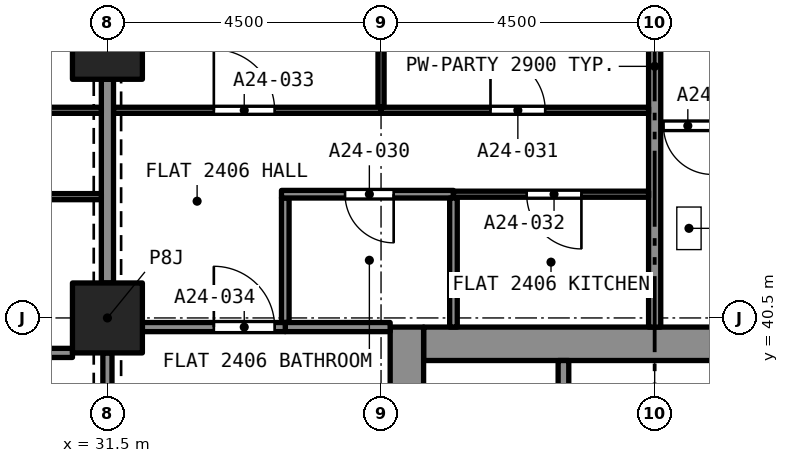
"""IFC4 building model, lengths in metres.
Left out: names, types, materials, properties, quantities, classifications, styles, units other than length and angle.
Written with IfcOpenShell. Run it as: python <this file> out.ifc"""

import sys

from ifc_helpers import new_model, si_unit, direction, frame, frame_2d, origin, origin_2d, place, context, subcontext, project, spatial, rectangle, extrude, element, fill, save


model = new_model("IFC4")
c1 = context("Model", 3, precision=1e-05, world=origin(), true_north=direction((0.0, 1.0)))
c2 = subcontext(c1, "Body", "Model", "MODEL_VIEW")
j1 = project(units=[si_unit("LENGTHUNIT", "METRE"), si_unit("PLANEANGLEUNIT", "RADIAN")], contexts=[c1])
p1 = place(None, origin())
s1 = spatial("IfcSite", under=j1, at=p1, CompositionType="ELEMENT")
p2 = place(p1, origin())
s2 = spatial("IfcBuilding", under=s1, at=p2, CompositionType="ELEMENT")
p3 = place(p2, frame((0.0, 0.0, 89.6)))
s3 = spatial("IfcBuildingStorey", under=s2, at=p3, CompositionType="ELEMENT", Elevation=89.6)
for number, where, z_axis, x_axis in (
    (1, (31.5, 40.5, 0.0), (0.0, 0.0, 1.0), (1.0, 0.0, 0.0)),
    (2, (31.5, 45.0, 0.0), (0.0, 0.0, 1.0), (1.0, 0.0, 0.0)),
):
    element("IfcColumn", number, at=place(p3, frame(where, z_axis=z_axis, x_axis=x_axis)), inside=s3, PredefinedType="COLUMN", context=c2, shape_type="SweptSolid", body=[
        extrude(rectangle(XDim=1.15, YDim=1.15, at=origin_2d()), origin(), (0.0, 0.0, 1.0), 3.2),
    ])
p4 = place(p3, frame((36.7, 40.075, 0.0), z_axis=(0.0, 0.0, 1.0), x_axis=(1.0, 0.0, 0.0)))
e3 = element("IfcWall", 3, at=p4, inside=s3, PredefinedType="SOLIDWALL", context=c2, shape_type="SweptSolid", body=[
    extrude(rectangle(XDim=7.6, YDim=0.55, at=frame_2d((3.8, 0.0))), origin(), (0.0, 0.0, 1.0), 3.2),
])
p5 = place(p3, frame((36.425, 27.15, 0.0), z_axis=(0.0, 0.0, 1.0), x_axis=(0.0, 1.0, 0.0)))
e4 = element("IfcWall", 4, at=p5, inside=s3, PredefinedType="SOLIDWALL", context=c2, shape_type="SweptSolid", body=[
    extrude(rectangle(XDim=13.2, YDim=0.55, at=frame_2d((6.6, 0.0))), origin(), (0.0, 0.0, 1.0), 3.2),
])
p6 = place(p5, frame((8.8, 0.0, 0.0)))
e5 = element("IfcOpeningElement", 5, at=p6, cuts=e4, PredefinedType="OPENING", context=c2, shape_type="SweptSolid", body=[
    extrude(rectangle(XDim=1.2, YDim=2.1, at=frame_2d((0.6, 1.05))), frame((0.0, 0.285, 0.0), z_axis=(0.0, -1.0, 0.0), x_axis=(1.0, 0.0, 0.0)), (0.0, 0.0, 1.0), 0.57),
])
p7 = place(p3, frame((41.591, 43.66, 0.0), z_axis=(0.0, 0.0, 1.0), x_axis=(-1.0, 0.0, 0.0)))
e6 = element("IfcWall", 6, at=p7, inside=s3, PredefinedType="PARTITIONING", context=c2, shape_type="SweptSolid", body=[
    extrude(rectangle(XDim=0.991, YDim=0.125, at=frame_2d((0.495, 0.0))), origin(), (0.0, 0.0, 1.0), 2.9),
])
p8 = place(p7, frame((0.146, 0.0, 0.0)))
e7 = element("IfcOpeningElement", 7, at=p8, cuts=e6, PredefinedType="OPENING", context=c2, shape_type="SweptSolid", body=[
    extrude(rectangle(XDim=0.8, YDim=2.1, at=frame_2d((0.4, 1.05))), frame((0.0, 0.073, 0.0), z_axis=(0.0, -1.0, 0.0), x_axis=(1.0, 0.0, 0.0)), (0.0, 0.0, 1.0), 0.145),
])
p9 = place(p3, frame((40.5, 40.35, 0.0), z_axis=(0.0, 0.0, 1.0), x_axis=(0.0, 1.0, 0.0)))
e8 = element("IfcWall", 8, at=p9, inside=s3, PredefinedType="PARTITIONING", context=c2, shape_type="SweptSolid", body=[
    extrude(rectangle(XDim=8.575, YDim=0.2, at=frame_2d((4.288, 0.0))), origin(), (0.0, 0.0, 1.0), 2.9),
])
p10 = place(p3, frame((34.425, 40.425, 0.0), z_axis=(0.0, 0.0, 1.0), x_axis=(0.0, 1.0, 0.0)))
e9 = element("IfcWall", 9, at=p10, inside=s3, PredefinedType="PARTITIONING", context=c2, shape_type="SweptSolid", body=[
    extrude(rectangle(XDim=2.047, YDim=0.125, at=frame_2d((1.024, 0.0))), origin(), (0.0, 0.0, 1.0), 2.9),
])
p11 = place(p3, frame((37.19, 42.535, 0.0), z_axis=(0.0, 0.0, 1.0), x_axis=(-1.0, 0.0, 0.0)))
e10 = element("IfcWall", 10, at=p11, inside=s3, PredefinedType="PARTITIONING", context=c2, shape_type="SweptSolid", body=[
    extrude(rectangle(XDim=2.828, YDim=0.125, at=frame_2d((1.414, 0.0))), origin(), (0.0, 0.0, 1.0), 2.9),
])
p12 = place(p11, frame((0.983, 0.0, 0.0)))
e11 = element("IfcOpeningElement", 11, at=p12, cuts=e10, PredefinedType="OPENING", context=c2, shape_type="SweptSolid", body=[
    extrude(rectangle(XDim=0.8, YDim=2.1, at=frame_2d((0.4, 1.05))), frame((0.0, 0.073, 0.0), z_axis=(0.0, -1.0, 0.0), x_axis=(1.0, 0.0, 0.0)), (0.0, 0.0, 1.0), 0.145),
])
p13 = place(p3, frame((37.191, 40.35, 0.0), z_axis=(0.0, 0.0, 1.0), x_axis=(0.0, 1.0, 0.0)))
e12 = element("IfcWall", 12, at=p13, inside=s3, PredefinedType="PARTITIONING", context=c2, shape_type="SweptSolid", body=[
    extrude(rectangle(XDim=2.122, YDim=0.125, at=frame_2d((1.061, 0.0))), origin(), (0.0, 0.0, 1.0), 2.9),
])
p14 = place(p3, frame((34.425, 40.35, 0.0), z_axis=(0.0, 0.0, 1.0), x_axis=(1.0, 0.0, 0.0)))
e13 = element("IfcWall", 13, at=p14, inside=s3, PredefinedType="PARTITIONING", context=c2, shape_type="SweptSolid", body=[
    extrude(rectangle(XDim=1.725, YDim=0.15, at=frame_2d((0.862, 0.0))), origin(), (0.0, 0.0, 1.0), 2.9),
])
p15 = place(p3, frame((36.0, 43.915, 0.0), z_axis=(0.0, 0.0, 1.0), x_axis=(1.0, 0.0, 0.0)))
e14 = element("IfcWall", 14, at=p15, inside=s3, PredefinedType="PARTITIONING", context=c2, shape_type="SweptSolid", body=[
    extrude(rectangle(XDim=4.4, YDim=0.1, at=frame_2d((2.2, 0.0))), origin(), (0.0, 0.0, 1.0), 2.9),
])
p16 = place(p15, frame((1.8, 0.0, 0.0)))
e15 = element("IfcOpeningElement", 15, at=p16, cuts=e14, PredefinedType="OPENING", context=c2, shape_type="SweptSolid", body=[
    extrude(rectangle(XDim=0.9, YDim=2.1, at=frame_2d((0.45, 1.05))), frame((0.0, 0.06, 0.0), z_axis=(0.0, -1.0, 0.0), x_axis=(1.0, 0.0, 0.0)), (0.0, 0.0, 1.0), 0.12),
])
p17 = place(p3, frame((36.0, 43.965, 0.0), z_axis=(0.0, 0.0, 1.0), x_axis=(0.0, 1.0, 0.0)))
e16 = element("IfcWall", 16, at=p17, inside=s3, PredefinedType="PARTITIONING", context=c2, shape_type="SweptSolid", body=[
    extrude(rectangle(XDim=4.96, YDim=0.1, at=frame_2d((2.48, 0.0))), origin(), (0.0, 0.0, 1.0), 2.9),
])
p18 = place(p3, frame((40.4, 42.535, 0.0), z_axis=(0.0, 0.0, 1.0), x_axis=(-1.0, 0.0, 0.0)))
e17 = element("IfcWall", 17, at=p18, inside=s3, PredefinedType="PARTITIONING", context=c2, shape_type="SweptSolid", body=[
    extrude(rectangle(XDim=3.209, YDim=0.1, at=frame_2d((1.605, 0.0))), origin(), (0.0, 0.0, 1.0), 2.9),
])
p19 = place(p18, frame((1.105, 0.0, 0.0)))
e18 = element("IfcOpeningElement", 18, at=p19, cuts=e17, PredefinedType="OPENING", context=c2, shape_type="SweptSolid", body=[
    extrude(rectangle(XDim=0.9, YDim=2.1, at=frame_2d((0.45, 1.05))), frame((0.0, 0.06, 0.0), z_axis=(0.0, -1.0, 0.0), x_axis=(1.0, 0.0, 0.0)), (0.0, 0.0, 1.0), 0.12),
])
p20 = place(p3, frame((31.6, 43.915, 0.0), z_axis=(0.0, 0.0, 1.0), x_axis=(1.0, 0.0, 0.0)))
e19 = element("IfcWall", 19, at=p20, inside=s3, PredefinedType="PARTITIONING", context=c2, shape_type="SweptSolid", body=[
    extrude(rectangle(XDim=4.4, YDim=0.1, at=frame_2d((2.2, 0.0))), origin(), (0.0, 0.0, 1.0), 2.9),
])
p21 = place(p20, frame((1.65, 0.0, 0.0)))
e20 = element("IfcOpeningElement", 20, at=p21, cuts=e19, PredefinedType="OPENING", context=c2, shape_type="SweptSolid", body=[
    extrude(rectangle(XDim=1.0, YDim=2.1, at=frame_2d((0.5, 1.05))), frame((0.0, 0.06, 0.0), z_axis=(0.0, -1.0, 0.0), x_axis=(1.0, 0.0, 0.0)), (0.0, 0.0, 1.0), 0.12),
])
p22 = place(p3, frame((31.5, 41.075, 0.0), z_axis=(0.0, 0.0, 1.0), x_axis=(0.0, 1.0, 0.0)))
e21 = element("IfcWall", 21, at=p22, inside=s3, PredefinedType="PARTITIONING", context=c2, shape_type="SweptSolid", body=[
    extrude(rectangle(XDim=3.35, YDim=0.2, at=frame_2d((1.675, 0.0))), origin(), (0.0, 0.0, 1.0), 2.38),
])
p23 = place(p3, frame((32.075, 40.35, 0.0), z_axis=(0.0, 0.0, 1.0), x_axis=(1.0, 0.0, 0.0)))
e22 = element("IfcWall", 22, at=p23, inside=s3, PredefinedType="PARTITIONING", context=c2, shape_type="SweptSolid", body=[
    extrude(rectangle(XDim=2.35, YDim=0.15, at=frame_2d((1.175, 0.0))), origin(), (0.0, 0.0, 1.0), 2.9),
])
p24 = place(p23, frame((1.175, 0.0, 0.0)))
e23 = element("IfcOpeningElement", 23, at=p24, cuts=e22, PredefinedType="OPENING", context=c2, shape_type="SweptSolid", body=[
    extrude(rectangle(XDim=1.0, YDim=2.1, at=frame_2d((0.5, 1.05))), frame((0.0, 0.085, 0.0), z_axis=(0.0, -1.0, 0.0), x_axis=(1.0, 0.0, 0.0)), (0.0, 0.0, 1.0), 0.17),
])
p25 = place(p3, frame((27.0, 43.915, 0.0), z_axis=(0.0, 0.0, 1.0), x_axis=(1.0, 0.0, 0.0)))
e24 = element("IfcWall", 24, at=p25, inside=s3, PredefinedType="PARTITIONING", context=c2, shape_type="SweptSolid", body=[
    extrude(rectangle(XDim=4.4, YDim=0.1, at=frame_2d((2.2, 0.0))), origin(), (0.0, 0.0, 1.0), 2.75),
])
p26 = place(p25, frame((1.8, 0.0, 0.0)))
e25 = element("IfcOpeningElement", 25, at=p26, cuts=e24, PredefinedType="OPENING", context=c2, shape_type="SweptSolid", body=[
    extrude(rectangle(XDim=0.9, YDim=2.1, at=frame_2d((0.45, 1.05))), frame((0.0, 0.06, 0.0), z_axis=(0.0, -1.0, 0.0), x_axis=(1.0, 0.0, 0.0)), (0.0, 0.0, 1.0), 0.12),
])
p27 = place(p3, frame((31.4, 42.495, 0.0), z_axis=(0.0, 0.0, 1.0), x_axis=(-1.0, 0.0, 0.0)))
e26 = element("IfcWall", 26, at=p27, inside=s3, PredefinedType="PARTITIONING", context=c2, shape_type="SweptSolid", body=[
    extrude(rectangle(XDim=9.4, YDim=0.1, at=frame_2d((4.7, 0.0))), origin(), (0.0, 0.0, 1.0), 2.75),
])
p28 = place(p27, frame((4.175, 0.0, 0.0)))
e27 = element("IfcOpeningElement", 27, at=p28, cuts=e26, PredefinedType="OPENING", context=c2, shape_type="SweptSolid", body=[
    extrude(rectangle(XDim=0.9, YDim=2.1, at=frame_2d((0.45, 1.05))), frame((0.0, 0.06, 0.0), z_axis=(0.0, -1.0, 0.0), x_axis=(1.0, 0.0, 0.0)), (0.0, 0.0, 1.0), 0.12),
])
p29 = place(p3, frame((22.05, 39.925, 0.0), z_axis=(0.0, 0.0, 1.0), x_axis=(1.0, 0.0, 0.0)))
e28 = element("IfcWall", 28, at=p29, inside=s3, PredefinedType="PARTITIONING", context=c2, shape_type="SweptSolid", body=[
    extrude(rectangle(XDim=8.875, YDim=0.15, at=frame_2d((4.438, 0.0))), origin(), (0.0, 0.0, 1.0), 2.75),
])
p30 = place(p3, frame((31.5, 36.575, 0.0), z_axis=(0.0, 0.0, 1.0), x_axis=(0.0, 1.0, 0.0)))
e29 = element("IfcWall", 29, at=p30, inside=s3, PredefinedType="PARTITIONING", context=c2, shape_type="SweptSolid", body=[
    extrude(rectangle(XDim=3.35, YDim=0.15, at=frame_2d((1.675, 0.0))), origin(), (0.0, 0.0, 1.0), 2.38),
])
p31 = place(p30, frame((1.075, 0.0, 0.0)))
e30 = element("IfcOpeningElement", 30, at=p31, cuts=e29, PredefinedType="OPENING", context=c2, shape_type="SweptSolid", body=[
    extrude(rectangle(XDim=1.2, YDim=2.1, at=frame_2d((0.6, 1.05))), frame((0.0, 0.085, 0.0), z_axis=(0.0, -1.0, 0.0), x_axis=(1.0, 0.0, 0.0)), (0.0, 0.0, 1.0), 0.17),
])
p32 = place(p3, frame((39.0, 37.5, 0.0), z_axis=(0.0, 0.0, 1.0), x_axis=(0.0, 1.0, 0.0)))
e31 = element("IfcWall", 31, at=p32, inside=s3, PredefinedType="SOLIDWALL", context=c2, shape_type="SweptSolid", body=[
    extrude(rectangle(XDim=2.3, YDim=0.175, at=frame_2d((1.15, 0.0))), origin(), (0.0, 0.0, 1.0), 2.9),
])
p33 = place(p8, origin())
e32 = element("IfcDoor", 32, at=p33, inside=s3, OperationType="SINGLE_SWING_RIGHT", PredefinedType="DOOR", context=c2, shape_type="SweptSolid", body=[
    extrude(rectangle(XDim=0.8, YDim=2.1, at=frame_2d((0.4, 1.05))), frame((0.0, 0.025, 0.0), z_axis=(0.0, -1.0, 0.0), x_axis=(1.0, 0.0, 0.0)), (0.0, 0.0, 1.0), 0.05),
])
fill(e7, e32)
p34 = place(p12, origin())
e33 = element("IfcDoor", 33, at=p34, inside=s3, OperationType="SINGLE_SWING_LEFT", PredefinedType="DOOR", context=c2, shape_type="SweptSolid", body=[
    extrude(rectangle(XDim=0.8, YDim=2.1, at=frame_2d((0.4, 1.05))), frame((0.0, 0.025, 0.0), z_axis=(0.0, -1.0, 0.0), x_axis=(1.0, 0.0, 0.0)), (0.0, 0.0, 1.0), 0.05),
])
fill(e11, e33)
p35 = place(p16, origin())
e34 = element("IfcDoor", 34, at=p35, inside=s3, OperationType="SINGLE_SWING_RIGHT", PredefinedType="DOOR", context=c2, shape_type="SweptSolid", body=[
    extrude(rectangle(XDim=0.9, YDim=2.1, at=frame_2d((0.45, 1.05))), frame((0.0, 0.025, 0.0), z_axis=(0.0, -1.0, 0.0), x_axis=(1.0, 0.0, 0.0)), (0.0, 0.0, 1.0), 0.05),
])
fill(e15, e34)
p36 = place(p19, origin())
e35 = element("IfcDoor", 35, at=p36, inside=s3, OperationType="SINGLE_SWING_LEFT", PredefinedType="DOOR", context=c2, shape_type="SweptSolid", body=[
    extrude(rectangle(XDim=0.9, YDim=2.1, at=frame_2d((0.45, 1.05))), frame((0.0, 0.025, 0.0), z_axis=(0.0, -1.0, 0.0), x_axis=(1.0, 0.0, 0.0)), (0.0, 0.0, 1.0), 0.05),
])
fill(e18, e35)
p37 = place(p21, origin())
e36 = element("IfcDoor", 36, at=p37, inside=s3, OperationType="SINGLE_SWING_LEFT", PredefinedType="DOOR", context=c2, shape_type="SweptSolid", body=[
    extrude(rectangle(XDim=1.0, YDim=2.1, at=frame_2d((0.5, 1.05))), frame((0.0, 0.025, 0.0), z_axis=(0.0, -1.0, 0.0), x_axis=(1.0, 0.0, 0.0)), (0.0, 0.0, 1.0), 0.05),
])
fill(e20, e36)
p38 = place(p24, origin())
e37 = element("IfcDoor", 37, at=p38, inside=s3, OperationType="SINGLE_SWING_RIGHT", PredefinedType="DOOR", context=c2, shape_type="SweptSolid", body=[
    extrude(rectangle(XDim=1.0, YDim=2.1, at=frame_2d((0.5, 1.05))), frame((0.0, 0.025, 0.0), z_axis=(0.0, -1.0, 0.0), x_axis=(1.0, 0.0, 0.0)), (0.0, 0.0, 1.0), 0.05),
])
fill(e23, e37)
save(model, sys.argv[1])
